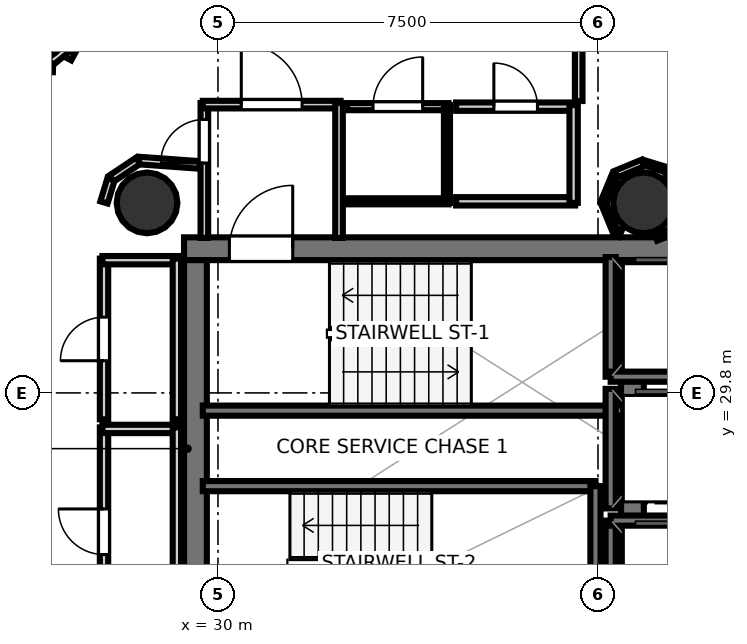
"""IFC4 building model, lengths in metres.
Left out: names, types, materials, properties, quantities, classifications, styles, units other than length and angle.
Written with IfcOpenShell. Run it as: python <this file> out.ifc"""

import sys

from ifc_helpers import new_model, si_unit, direction, frame, frame_2d, origin, origin_2d, place, context, subcontext, project, spatial, rectangle, hollow_circle, extrude, element, fill, save


model = new_model("IFC4")
c1 = context("Model", 3, precision=1e-05, world=origin(), true_north=direction((0.0, 1.0)))
c2 = subcontext(c1, "Body", "Model", "MODEL_VIEW")
j1 = project(units=[si_unit("LENGTHUNIT", "METRE"), si_unit("PLANEANGLEUNIT", "RADIAN")], contexts=[c1])
p1 = place(None, origin())
s1 = spatial("IfcSite", under=j1, at=p1, CompositionType="ELEMENT")
p2 = place(p1, origin())
s2 = spatial("IfcBuilding", under=s1, at=p2, CompositionType="ELEMENT")
p3 = place(p2, frame((0.0, 0.0, 192.9)))
s3 = spatial("IfcBuildingStorey", under=s2, at=p3, CompositionType="ELEMENT", Elevation=192.9)
p4 = place(p3, frame((29.33, 32.645, 0.0), z_axis=(0.0, 0.0, 1.0), x_axis=(1.0, 0.0, 0.0)))
e1 = element("IfcWall", 1, at=p4, inside=s3, PredefinedType="SHEAR", context=c2, shape_type="SweptSolid", body=[
    extrude(rectangle(XDim=10.52, YDim=0.45, at=frame_2d((5.26, 0.0))), origin(), (0.0, 0.0, 1.0), 3.52),
])
p5 = place(p4, frame((0.895, 0.0, 0.0)))
e2 = element("IfcOpeningElement", 2, at=p5, cuts=e1, PredefinedType="OPENING", context=c2, shape_type="SweptSolid", body=[
    extrude(rectangle(XDim=1.25, YDim=2.15, at=frame_2d((0.625, 1.075))), frame((0.0, 0.235, 0.0), z_axis=(0.0, -1.0, 0.0), x_axis=(1.0, 0.0, 0.0)), (0.0, 0.0, 1.0), 0.47),
])
for number, where, z_axis, x_axis in (
    (3, (29.555, 24.98, 0.0), (0.0, 0.0, 1.0), (0.0, 1.0, 0.0)),
    (4, (38.18, 24.98, 0.0), (0.0, 0.0, 1.0), (0.0, 1.0, 0.0)),
):
    element("IfcWall", number, at=place(p3, frame(where, z_axis=z_axis, x_axis=x_axis)), inside=s3, PredefinedType="SHEAR", context=c2, shape_type="SweptSolid", body=[
        extrude(rectangle(XDim=7.44, YDim=0.45, at=frame_2d((3.72, 0.0))), origin(), (0.0, 0.0, 1.0), 3.52),
    ])
for number, where, z_axis, x_axis in (
    (5, (28.6, 33.55, 0.0), (0.0, 0.0, 1.0), (1.0, 0.0, 0.0)),
    (6, (38.4, 33.55, 0.0), (0.0, 0.0, 1.0), (1.0, 0.0, 0.0)),
    (7, (26.431, 36.992, 0.0), (0.0, 0.0, 1.0), (1.0, 0.0, 0.0)),
):
    element("IfcColumn", number, at=place(p3, frame(where, z_axis=z_axis, x_axis=x_axis)), inside=s3, PredefinedType="COLUMN", context=c2, shape_type="SweptSolid", body=[
        extrude(hollow_circle(Radius=0.6, WallThickness=0.03, at=origin_2d()), origin(), (0.0, 0.0, 1.0), 3.7),
    ])
p6 = place(p3, frame((29.7, 29.45, 0.0), z_axis=(0.0, 0.0, 1.0), x_axis=(1.0, 0.0, 0.0)))
e8 = element("IfcWall", 8, at=p6, inside=s3, PredefinedType="SOLIDWALL", context=c2, shape_type="SweptSolid", body=[
    extrude(rectangle(XDim=8.3, YDim=0.2, at=frame_2d((4.15, 0.0))), origin(), (0.0, 0.0, 1.0), 3.52),
])
p7 = place(p3, frame((29.7, 27.96, 0.0), z_axis=(0.0, 0.0, 1.0), x_axis=(1.0, 0.0, 0.0)))
e9 = element("IfcWall", 9, at=p7, inside=s3, PredefinedType="SOLIDWALL", context=c2, shape_type="SweptSolid", body=[
    extrude(rectangle(XDim=7.75, YDim=0.2, at=frame_2d((3.875, 0.0))), origin(), (0.0, 0.0, 1.0), 3.52),
])
p8 = place(p3, frame((37.45, 24.9, 0.0), z_axis=(0.0, 0.0, 1.0), x_axis=(0.0, 1.0, 0.0)))
e10 = element("IfcWall", 10, at=p8, inside=s3, PredefinedType="SOLIDWALL", context=c2, shape_type="SweptSolid", body=[
    extrude(rectangle(XDim=3.06, YDim=0.2, at=frame_2d((1.53, 0.0))), origin(), (0.0, 0.0, 1.0), 3.52),
])
p9 = place(p3, frame((37.75, 30.12, 0.0), z_axis=(0.0, 0.0, 1.0), x_axis=(0.0, 1.0, 0.0)))
e11 = element("IfcWall", 11, at=p9, inside=s3, PredefinedType="SOLIDWALL", context=c2, shape_type="SweptSolid", body=[
    extrude(rectangle(XDim=2.36, YDim=0.2, at=frame_2d((1.18, 0.0))), origin(), (0.0, 0.0, 1.0), 3.52),
])
p10 = place(p3, frame((37.75, 30.12, 0.0), z_axis=(0.0, 0.0, 1.0), x_axis=(1.0, 0.0, 0.0)))
e12 = element("IfcWall", 12, at=p10, inside=s3, PredefinedType="SOLIDWALL", context=c2, shape_type="SweptSolid", body=[
    extrude(rectangle(XDim=2.1, YDim=0.2, at=frame_2d((1.05, 0.0))), origin(), (0.0, 0.0, 1.0), 3.52),
])
p11 = place(p3, frame((37.75, 24.92, 0.0), z_axis=(0.0, 0.0, 1.0), x_axis=(0.0, 1.0, 0.0)))
e13 = element("IfcWall", 13, at=p11, inside=s3, PredefinedType="SOLIDWALL", context=c2, shape_type="SweptSolid", body=[
    extrude(rectangle(XDim=2.36, YDim=0.2, at=frame_2d((1.18, 0.0))), origin(), (0.0, 0.0, 1.0), 3.52),
])
p12 = place(p3, frame((37.75, 27.28, 0.0), z_axis=(0.0, 0.0, 1.0), x_axis=(1.0, 0.0, 0.0)))
e14 = element("IfcWall", 14, at=p12, inside=s3, PredefinedType="SOLIDWALL", context=c2, shape_type="SweptSolid", body=[
    extrude(rectangle(XDim=2.1, YDim=0.2, at=frame_2d((1.05, 0.0))), origin(), (0.0, 0.0, 1.0), 3.52),
])
p13 = place(p3, frame((37.75, 27.52, 0.0), z_axis=(0.0, 0.0, 1.0), x_axis=(0.0, 1.0, 0.0)))
e15 = element("IfcWall", 15, at=p13, inside=s3, PredefinedType="SOLIDWALL", context=c2, shape_type="SweptSolid", body=[
    extrude(rectangle(XDim=2.36, YDim=0.2, at=frame_2d((1.18, 0.0))), origin(), (0.0, 0.0, 1.0), 3.52),
])
p14 = place(p3, frame((29.731, 32.858, 0.0), z_axis=(0.0, 0.0, 1.0), x_axis=(0.0, 1.0, 0.0)))
e16 = element("IfcWall", 16, at=p14, inside=s3, PredefinedType="PARTITIONING", context=c2, shape_type="SweptSolid", body=[
    extrude(rectangle(XDim=2.662, YDim=0.15, at=frame_2d((1.331, 0.0))), origin(), (0.0, 0.0, 1.0), 2.84),
])
p15 = place(p14, frame((1.478, 0.0, 0.0)))
e17 = element("IfcOpeningElement", 17, at=p15, cuts=e16, PredefinedType="OPENING", context=c2, shape_type="SweptSolid", body=[
    extrude(rectangle(XDim=0.86, YDim=2.05, at=frame_2d((0.43, 1.025))), frame((0.0, 0.085, 0.0), z_axis=(0.0, -1.0, 0.0), x_axis=(1.0, 0.0, 0.0)), (0.0, 0.0, 1.0), 0.17),
])
p16 = place(p3, frame((29.7, 35.489, 0.0), z_axis=(0.0, 0.0, 1.0), x_axis=(1.0, 0.0, 0.0)))
e18 = element("IfcWall", 18, at=p16, inside=s3, PredefinedType="PARTITIONING", context=c2, shape_type="SweptSolid", body=[
    extrude(rectangle(XDim=2.72, YDim=0.15, at=frame_2d((1.36, 0.0))), origin(), (0.0, 0.0, 1.0), 2.84),
])
p17 = place(p16, frame((0.76, 0.0, 0.0)))
e19 = element("IfcOpeningElement", 19, at=p17, cuts=e18, PredefinedType="OPENING", context=c2, shape_type="SweptSolid", body=[
    extrude(rectangle(XDim=1.2, YDim=2.15, at=frame_2d((0.6, 1.075))), frame((0.0, 0.085, 0.0), z_axis=(0.0, -1.0, 0.0), x_axis=(1.0, 0.0, 0.0)), (0.0, 0.0, 1.0), 0.17),
])
p18 = place(p3, frame((32.389, 35.52, 0.0), z_axis=(0.0, 0.0, 1.0), x_axis=(0.0, -1.0, 0.0)))
e20 = element("IfcWall", 20, at=p18, inside=s3, PredefinedType="PARTITIONING", context=c2, shape_type="SweptSolid", body=[
    extrude(rectangle(XDim=2.662, YDim=0.15, at=frame_2d((1.331, 0.0))), origin(), (0.0, 0.0, 1.0), 2.84),
])
p19 = place(p3, frame((34.55, 33.581, 0.0), z_axis=(0.0, 0.0, 1.0), x_axis=(-1.0, 0.0, 0.0)))
e21 = element("IfcWall", 21, at=p19, inside=s3, PredefinedType="PARTITIONING", context=c2, shape_type="SweptSolid", body=[
    extrude(rectangle(XDim=2.0, YDim=0.12, at=frame_2d((1.0, 0.0))), origin(), (0.0, 0.0, 1.0), 2.84),
])
p20 = place(p3, frame((32.55, 35.449, 0.0), z_axis=(0.0, 0.0, 1.0), x_axis=(1.0, 0.0, 0.0)))
e22 = element("IfcWall", 22, at=p20, inside=s3, PredefinedType="PARTITIONING", context=c2, shape_type="SweptSolid", body=[
    extrude(rectangle(XDim=2.0, YDim=0.14, at=frame_2d((1.0, 0.0))), origin(), (0.0, 0.0, 1.0), 2.84),
])
p21 = place(p20, frame((0.51, 0.0, 0.0)))
e23 = element("IfcOpeningElement", 23, at=p21, cuts=e22, PredefinedType="OPENING", context=c2, shape_type="SweptSolid", body=[
    extrude(rectangle(XDim=0.98, YDim=2.1, at=frame_2d((0.49, 1.05))), frame((0.0, 0.08, 0.0), z_axis=(0.0, -1.0, 0.0), x_axis=(1.0, 0.0, 0.0)), (0.0, 0.0, 1.0), 0.16),
])
p22 = place(p3, frame((34.519, 35.48, 0.0), z_axis=(0.0, 0.0, 1.0), x_axis=(0.0, -1.0, 0.0)))
e24 = element("IfcWall", 24, at=p22, inside=s3, PredefinedType="PARTITIONING", context=c2, shape_type="SweptSolid", body=[
    extrude(rectangle(XDim=1.93, YDim=0.12, at=frame_2d((0.965, 0.0))), origin(), (0.0, 0.0, 1.0), 2.84),
])
p23 = place(p3, frame((37.05, 33.581, 0.0), z_axis=(0.0, 0.0, 1.0), x_axis=(-1.0, 0.0, 0.0)))
e25 = element("IfcWall", 25, at=p23, inside=s3, PredefinedType="PLUMBINGWALL", context=c2, shape_type="SweptSolid", body=[
    extrude(rectangle(XDim=2.35, YDim=0.165, at=frame_2d((1.175, 0.0))), origin(), (0.0, 0.0, 1.0), 2.84),
])
p24 = place(p3, frame((34.7, 35.449, 0.0), z_axis=(0.0, 0.0, 1.0), x_axis=(1.0, 0.0, 0.0)))
e26 = element("IfcWall", 26, at=p24, inside=s3, PredefinedType="PLUMBINGWALL", context=c2, shape_type="SweptSolid", body=[
    extrude(rectangle(XDim=2.35, YDim=0.165, at=frame_2d((1.175, 0.0))), origin(), (0.0, 0.0, 1.0), 2.84),
])
p25 = place(p24, frame((0.745, 0.0, 0.0)))
e27 = element("IfcOpeningElement", 27, at=p25, cuts=e26, PredefinedType="OPENING", context=c2, shape_type="SweptSolid", body=[
    extrude(rectangle(XDim=0.86, YDim=2.05, at=frame_2d((0.43, 1.025))), frame((0.0, 0.093, 0.0), z_axis=(0.0, -1.0, 0.0), x_axis=(1.0, 0.0, 0.0)), (0.0, 0.0, 1.0), 0.185),
])
p26 = place(p3, frame((37.019, 35.48, 0.0), z_axis=(0.0, 0.0, 1.0), x_axis=(0.0, -1.0, 0.0)))
e28 = element("IfcWall", 28, at=p26, inside=s3, PredefinedType="PLUMBINGWALL", context=c2, shape_type="SweptSolid", body=[
    extrude(rectangle(XDim=1.93, YDim=0.165, at=frame_2d((0.965, 0.0))), origin(), (0.0, 0.0, 1.0), 2.84),
])
p27 = place(p3, frame((27.751, 25.0, 0.0), z_axis=(0.0, 0.0, 1.0), x_axis=(0.0, 1.0, 0.0)))
e29 = element("IfcWall", 29, at=p27, inside=s3, PredefinedType="PLUMBINGWALL", context=c2, shape_type="SweptSolid", body=[
    extrude(rectangle(XDim=4.12, YDim=0.165, at=frame_2d((2.06, 0.0))), origin(), (0.0, 0.0, 1.0), 2.84),
])
p28 = place(p27, frame((1.61, 0.0, 0.0)))
e30 = element("IfcOpeningElement", 30, at=p28, cuts=e29, PredefinedType="OPENING", context=c2, shape_type="SweptSolid", body=[
    extrude(rectangle(XDim=0.9, YDim=2.1, at=frame_2d((0.45, 1.05))), frame((0.0, 0.093, 0.0), z_axis=(0.0, -1.0, 0.0), x_axis=(1.0, 0.0, 0.0)), (0.0, 0.0, 1.0), 0.185),
])
p29 = place(p3, frame((27.72, 29.089, 0.0), z_axis=(0.0, 0.0, 1.0), x_axis=(1.0, 0.0, 0.0)))
e31 = element("IfcWall", 31, at=p29, inside=s3, PredefinedType="PLUMBINGWALL", context=c2, shape_type="SweptSolid", body=[
    extrude(rectangle(XDim=1.5, YDim=0.165, at=frame_2d((0.75, 0.0))), origin(), (0.0, 0.0, 1.0), 2.84),
])
p30 = place(p3, frame((29.189, 29.12, 0.0), z_axis=(0.0, 0.0, 1.0), x_axis=(0.0, -1.0, 0.0)))
e32 = element("IfcWall", 32, at=p30, inside=s3, PredefinedType="PLUMBINGWALL", context=c2, shape_type="SweptSolid", body=[
    extrude(rectangle(XDim=4.12, YDim=0.165, at=frame_2d((2.06, 0.0))), origin(), (0.0, 0.0, 1.0), 2.84),
])
p31 = place(p3, frame((27.751, 29.28, 0.0), z_axis=(0.0, 0.0, 1.0), x_axis=(0.0, 1.0, 0.0)))
e33 = element("IfcWall", 33, at=p31, inside=s3, PredefinedType="PLUMBINGWALL", context=c2, shape_type="SweptSolid", body=[
    extrude(rectangle(XDim=3.17, YDim=0.165, at=frame_2d((1.585, 0.0))), origin(), (0.0, 0.0, 1.0), 2.84),
])
p32 = place(p31, frame((1.155, 0.0, 0.0)))
e34 = element("IfcOpeningElement", 34, at=p32, cuts=e33, PredefinedType="OPENING", context=c2, shape_type="SweptSolid", body=[
    extrude(rectangle(XDim=0.86, YDim=2.05, at=frame_2d((0.43, 1.025))), frame((0.0, 0.093, 0.0), z_axis=(0.0, -1.0, 0.0), x_axis=(1.0, 0.0, 0.0)), (0.0, 0.0, 1.0), 0.185),
])
p33 = place(p3, frame((27.72, 32.419, 0.0), z_axis=(0.0, 0.0, 1.0), x_axis=(1.0, 0.0, 0.0)))
e35 = element("IfcWall", 35, at=p33, inside=s3, PredefinedType="PLUMBINGWALL", context=c2, shape_type="SweptSolid", body=[
    extrude(rectangle(XDim=1.5, YDim=0.165, at=frame_2d((0.75, 0.0))), origin(), (0.0, 0.0, 1.0), 2.84),
])
p34 = place(p3, frame((29.189, 32.45, 0.0), z_axis=(0.0, 0.0, 1.0), x_axis=(0.0, -1.0, 0.0)))
e36 = element("IfcWall", 36, at=p34, inside=s3, PredefinedType="PLUMBINGWALL", context=c2, shape_type="SweptSolid", body=[
    extrude(rectangle(XDim=3.17, YDim=0.165, at=frame_2d((1.585, 0.0))), origin(), (0.0, 0.0, 1.0), 2.84),
])
p35 = place(p3, frame((37.119, 38.355, 0.0), z_axis=(0.0, 0.0, 1.0), x_axis=(0.0, -1.0, 0.0)))
e37 = element("IfcWall", 37, at=p35, inside=s3, PredefinedType="PARTITIONING", context=c2, shape_type="SweptSolid", body=[
    extrude(rectangle(XDim=2.795, YDim=0.15, at=frame_2d((1.397, 0.0))), origin(), (0.0, 0.0, 1.0), 2.84),
])
p36 = place(p3, frame((29.64, 34.299, 0.0), z_axis=(0.0, 0.0, 1.0), x_axis=(-0.997392224386, 0.072171675429, 0.0)))
e38 = element("IfcWall", 38, at=p36, inside=s3, PredefinedType="PARTITIONING", context=c2, shape_type="SweptSolid", body=[
    extrude(rectangle(XDim=1.201, YDim=0.15, at=frame_2d((0.601, 0.0))), origin(), (0.0, 0.0, 1.0), 2.84),
])
p37 = place(p3, frame((28.423, 34.38, 0.0), z_axis=(0.0, 0.0, 1.0), x_axis=(-0.831571279003, -0.555418047903, 0.0)))
e39 = element("IfcWall", 39, at=p37, inside=s3, PredefinedType="PARTITIONING", context=c2, shape_type="SweptSolid", body=[
    extrude(rectangle(XDim=0.628, YDim=0.15, at=frame_2d((0.314, 0.0))), origin(), (0.0, 0.0, 1.0), 2.84),
])
p38 = place(p3, frame((27.888, 34.015, 0.0), z_axis=(0.0, 0.0, 1.0), x_axis=(-0.290263585829, -0.956946733492, 0.0)))
e40 = element("IfcWall", 40, at=p38, inside=s3, PredefinedType="PARTITIONING", context=c2, shape_type="SweptSolid", body=[
    extrude(rectangle(XDim=0.476, YDim=0.15, at=frame_2d((0.238, 0.0))), origin(), (0.0, 0.0, 1.0), 2.84),
])
p39 = place(p3, frame((25.449, 36.238, 0.0), z_axis=(0.0, 0.0, 1.0), x_axis=(0.999651698073, -0.026390955635, 0.0)))
e41 = element("IfcWall", 41, at=p39, inside=s3, PredefinedType="PARTITIONING", context=c2, shape_type="SweptSolid", body=[
    extrude(rectangle(XDim=1.295, YDim=0.15, at=frame_2d((0.647, 0.0))), origin(), (0.0, 0.0, 1.0), 2.84),
])
p40 = place(p3, frame((27.038, 36.398, 0.0), z_axis=(0.0, 0.0, 1.0), x_axis=(0.471865548338, 0.881670519123, 0.0)))
e42 = element("IfcWall", 42, at=p40, inside=s3, PredefinedType="PARTITIONING", context=c2, shape_type="SweptSolid", body=[
    extrude(rectangle(XDim=0.476, YDim=0.15, at=frame_2d((0.238, 0.0))), origin(), (0.0, 0.0, 1.0), 2.84),
])
p41 = place(p3, frame((39.166, 33.733, 0.0), z_axis=(0.0, 0.0, 1.0), x_axis=(-0.563162199293, 0.826346378517, 0.0)))
e43 = element("IfcWall", 43, at=p41, inside=s3, PredefinedType="PARTITIONING", context=c2, shape_type="SweptSolid", body=[
    extrude(rectangle(XDim=0.564, YDim=0.12, at=frame_2d((0.282, 0.0))), origin(), (0.0, 0.0, 1.0), 2.84),
])
p42 = place(p3, frame((38.831, 34.212, 0.0), z_axis=(0.0, 0.0, 1.0), x_axis=(-0.957061618741, 0.289884559665, 0.0)))
e44 = element("IfcWall", 44, at=p42, inside=s3, PredefinedType="PARTITIONING", context=c2, shape_type="SweptSolid", body=[
    extrude(rectangle(XDim=0.441, YDim=0.105, at=frame_2d((0.221, 0.0))), origin(), (0.0, 0.0, 1.0), 2.84),
])
p43 = place(p3, frame((38.388, 34.339, 0.0), z_axis=(0.0, 0.0, 1.0), x_axis=(-0.923894108428, -0.382648241093, 0.0)))
e45 = element("IfcWall", 45, at=p43, inside=s3, PredefinedType="PARTITIONING", context=c2, shape_type="SweptSolid", body=[
    extrude(rectangle(XDim=0.582, YDim=0.14, at=frame_2d((0.291, 0.0))), origin(), (0.0, 0.0, 1.0), 2.84),
])
p44 = place(p3, frame((37.834, 34.099, 0.0), z_axis=(0.0, 0.0, 1.0), x_axis=(-0.382796622927, -0.923832639322, 0.0)))
e46 = element("IfcWall", 46, at=p44, inside=s3, PredefinedType="PARTITIONING", context=c2, shape_type="SweptSolid", body=[
    extrude(rectangle(XDim=0.582, YDim=0.12, at=frame_2d((0.291, 0.0))), origin(), (0.0, 0.0, 1.0), 2.84),
])
p45 = place(p3, frame((37.611, 33.538, 0.0), z_axis=(0.0, 0.0, 1.0), x_axis=(0.382796622927, -0.923832639322, 0.0)))
e47 = element("IfcWall", 47, at=p45, inside=s3, PredefinedType="PARTITIONING", context=c2, shape_type="SweptSolid", body=[
    extrude(rectangle(XDim=0.582, YDim=0.105, at=frame_2d((0.291, 0.0))), origin(), (0.0, 0.0, 1.0), 2.84),
])
p46 = place(p3, frame((37.851, 32.984, 0.0), z_axis=(0.0, 0.0, 1.0), x_axis=(0.924628481531, -0.380870281252, 0.0)))
e48 = element("IfcWall", 48, at=p46, inside=s3, PredefinedType="PARTITIONING", context=c2, shape_type="SweptSolid", body=[
    extrude(rectangle(XDim=0.102, YDim=0.14, at=frame_2d((0.051, 0.0))), origin(), (0.0, 0.0, 1.0), 2.84),
])
p47 = place(p3, frame((38.645, 32.858, 0.0), z_axis=(0.0, 0.0, 1.0), x_axis=(0.923908393326, 0.382613748761, 0.0)))
e49 = element("IfcWall", 49, at=p47, inside=s3, PredefinedType="PARTITIONING", context=c2, shape_type="SweptSolid", body=[
    extrude(rectangle(XDim=0.329, YDim=0.12, at=frame_2d((0.165, 0.0))), origin(), (0.0, 0.0, 1.0), 2.84),
])
p48 = place(p3, frame((37.222, 37.742, 0.0), z_axis=(0.0, 0.0, 1.0), x_axis=(0.97049288978, -0.241129738703, 0.0)))
e50 = element("IfcWall", 50, at=p48, inside=s3, PredefinedType="PARTITIONING", context=c2, shape_type="SweptSolid", body=[
    extrude(rectangle(XDim=9.44, YDim=0.14, at=frame_2d((4.72, 0.0))), origin(), (0.0, 0.0, 1.0), 2.84),
])
p49 = place(p3, frame((27.024, 36.602, 0.0), z_axis=(0.0, 0.0, 1.0), x_axis=(-0.775745027902, -0.631046473475, 0.0)))
e51 = element("IfcWall", 51, at=p49, inside=s3, PredefinedType="PLUMBINGWALL", context=c2, shape_type="SweptSolid", body=[
    extrude(rectangle(XDim=0.425, YDim=0.165, at=frame_2d((0.213, 0.0))), origin(), (0.0, 0.0, 1.0), 2.84),
])
p50 = place(p5, origin())
e52 = element("IfcDoor", 52, at=p50, inside=s3, OperationType="SINGLE_SWING_RIGHT", PredefinedType="DOOR", context=c2, shape_type="SweptSolid", body=[
    extrude(rectangle(XDim=1.25, YDim=2.15, at=frame_2d((0.625, 1.075))), frame((0.0, 0.025, 0.0), z_axis=(0.0, -1.0, 0.0), x_axis=(1.0, 0.0, 0.0)), (0.0, 0.0, 1.0), 0.05),
])
fill(e2, e52)
p51 = place(p17, origin())
e53 = element("IfcDoor", 53, at=p51, inside=s3, OperationType="SINGLE_SWING_LEFT", PredefinedType="DOOR", context=c2, shape_type="SweptSolid", body=[
    extrude(rectangle(XDim=1.2, YDim=2.15, at=frame_2d((0.6, 1.075))), frame((0.0, 0.025, 0.0), z_axis=(0.0, -1.0, 0.0), x_axis=(1.0, 0.0, 0.0)), (0.0, 0.0, 1.0), 0.05),
])
fill(e19, e53)
p52 = place(p21, origin())
e54 = element("IfcDoor", 54, at=p52, inside=s3, OperationType="SINGLE_SWING_RIGHT", PredefinedType="DOOR", context=c2, shape_type="SweptSolid", body=[
    extrude(rectangle(XDim=0.98, YDim=2.1, at=frame_2d((0.49, 1.05))), frame((0.0, 0.025, 0.0), z_axis=(0.0, -1.0, 0.0), x_axis=(1.0, 0.0, 0.0)), (0.0, 0.0, 1.0), 0.05),
])
fill(e23, e54)
p53 = place(p25, origin())
e55 = element("IfcDoor", 55, at=p53, inside=s3, OperationType="SINGLE_SWING_LEFT", PredefinedType="DOOR", context=c2, shape_type="SweptSolid", body=[
    extrude(rectangle(XDim=0.86, YDim=2.05, at=frame_2d((0.43, 1.025))), frame((0.0, 0.025, 0.0), z_axis=(0.0, -1.0, 0.0), x_axis=(1.0, 0.0, 0.0)), (0.0, 0.0, 1.0), 0.05),
])
fill(e27, e55)
p54 = place(p28, origin())
e56 = element("IfcDoor", 56, at=p54, inside=s3, OperationType="SINGLE_SWING_RIGHT", PredefinedType="DOOR", context=c2, shape_type="SweptSolid", body=[
    extrude(rectangle(XDim=0.9, YDim=2.1, at=frame_2d((0.45, 1.05))), frame((0.0, 0.025, 0.0), z_axis=(0.0, -1.0, 0.0), x_axis=(1.0, 0.0, 0.0)), (0.0, 0.0, 1.0), 0.05),
])
fill(e30, e56)
p55 = place(p32, origin())
e57 = element("IfcDoor", 57, at=p55, inside=s3, OperationType="SINGLE_SWING_LEFT", PredefinedType="DOOR", context=c2, shape_type="SweptSolid", body=[
    extrude(rectangle(XDim=0.86, YDim=2.05, at=frame_2d((0.43, 1.025))), frame((0.0, 0.025, 0.0), z_axis=(0.0, -1.0, 0.0), x_axis=(1.0, 0.0, 0.0)), (0.0, 0.0, 1.0), 0.05),
])
fill(e34, e57)
p56 = place(p15, origin())
e58 = element("IfcDoor", 58, at=p56, inside=s3, OperationType="SINGLE_SWING_LEFT", PredefinedType="DOOR", context=c2, shape_type="SweptSolid", body=[
    extrude(rectangle(XDim=0.86, YDim=2.05, at=frame_2d((0.43, 1.025))), frame((0.0, 0.025, 0.0), z_axis=(0.0, -1.0, 0.0), x_axis=(1.0, 0.0, 0.0)), (0.0, 0.0, 1.0), 0.05),
])
fill(e17, e58)
save(model, sys.argv[1])
